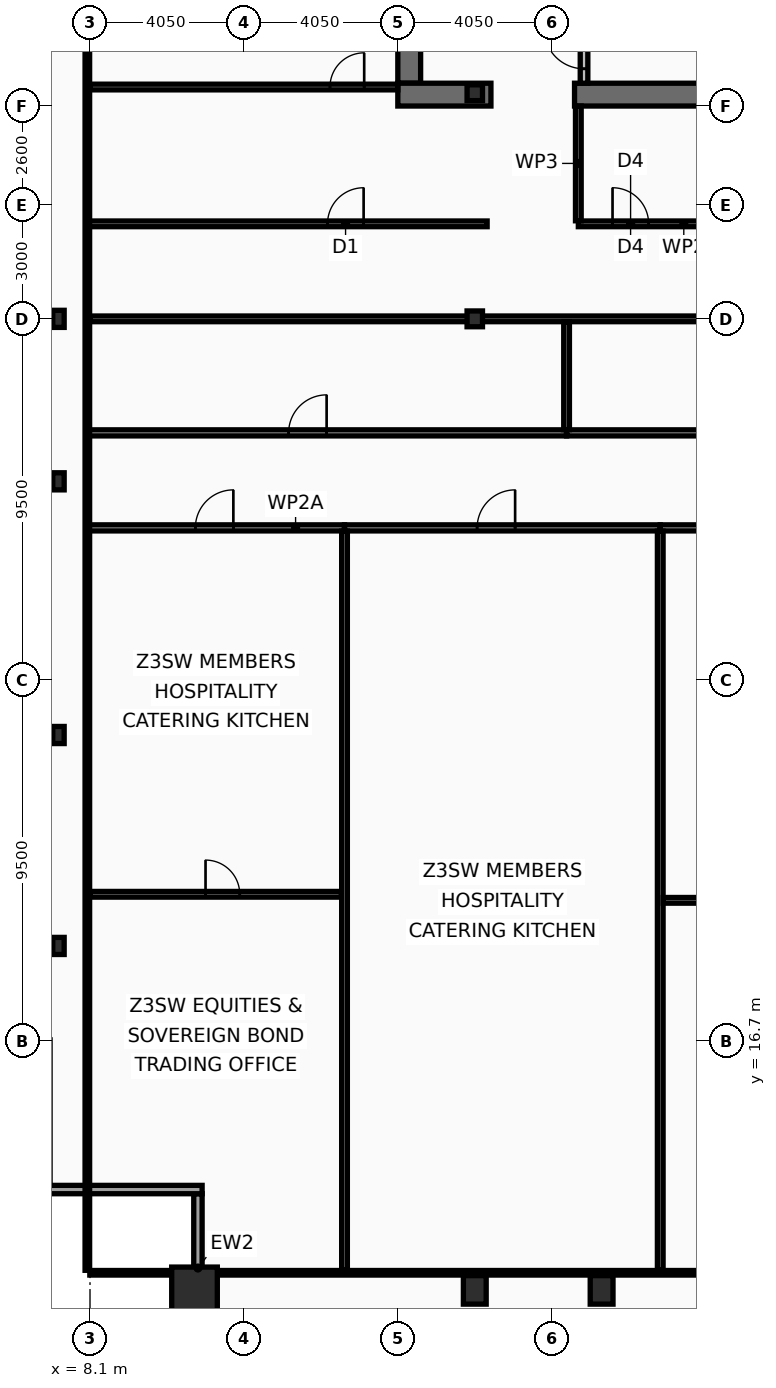
"""IFC4 building model, lengths in metres.
Left out: names, types, materials, properties, quantities, classifications, styles, units other than length and angle.
Written with IfcOpenShell. Run it as: python <this file> out.ifc"""

import sys

from ifc_helpers import new_model, si_unit, direction, frame, frame_2d, origin, origin_2d, place, context, subcontext, project, spatial, rectangle, hollow_rectangle, i_section, extrude, element, fill, save


model = new_model("IFC4")
c1 = context("Model", 3, precision=1e-05, world=origin(), true_north=direction((0.0, 1.0)))
c2 = subcontext(c1, "Body", "Model", "MODEL_VIEW")
j1 = project(units=[si_unit("LENGTHUNIT", "METRE"), si_unit("PLANEANGLEUNIT", "RADIAN")], contexts=[c1])
p1 = place(None, origin())
s1 = spatial("IfcSite", under=j1, at=p1, CompositionType="ELEMENT")
p2 = place(p1, origin())
s2 = spatial("IfcBuilding", under=s1, at=p2, CompositionType="ELEMENT")
p3 = place(p2, frame((0.0, 0.0, 221.0)))
s3 = spatial("IfcBuildingStorey", under=s2, at=p3, CompositionType="ELEMENT", Elevation=221.0)
p4 = place(p3, frame((16.5, 41.9, 0.0), z_axis=(0.0, 0.0, 1.0), x_axis=(0.0, 1.0, 0.0)))
e1 = element("IfcWall", 1, at=p4, inside=s3, PredefinedType="SHEAR", context=c2, shape_type="SweptSolid", body=[
    extrude(rectangle(XDim=11.2, YDim=0.6, at=frame_2d((5.6, 0.0))), origin(), (0.0, 0.0, 1.0), 3.44),
])
p5 = place(p3, frame((18.65, 41.6, 0.0), z_axis=(0.0, 0.0, 1.0), x_axis=(-1.0, 0.0, 0.0)))
e2 = element("IfcWall", 2, at=p5, inside=s3, PredefinedType="SHEAR", context=c2, shape_type="SweptSolid", body=[
    extrude(rectangle(XDim=2.45, YDim=0.6, at=frame_2d((1.225, 0.0))), origin(), (0.0, 0.0, 1.0), 3.44),
])
p6 = place(p3, frame((32.3, 41.6, 0.0), z_axis=(0.0, 0.0, 1.0), x_axis=(-1.0, 0.0, 0.0)))
e3 = element("IfcWall", 3, at=p6, inside=s3, PredefinedType="SHEAR", context=c2, shape_type="SweptSolid", body=[
    extrude(rectangle(XDim=11.45, YDim=0.6, at=frame_2d((5.725, 0.0))), origin(), (0.0, 0.0, 1.0), 3.44),
])
p7 = place(p3, frame((10.85, 10.15, 0.0), z_axis=(0.0, 0.0, 1.0), x_axis=(1.0, 0.0, 0.0)))
e4 = element("IfcColumn", 4, at=p7, inside=s3, PredefinedType="COLUMN", context=c2, shape_type="SweptSolid", body=[
    extrude(hollow_rectangle(XDim=1.2, YDim=1.2, WallThickness=0.06, at=origin_2d()), origin(), (0.0, 0.0, 1.0), 3.6),
])
for number, where, z_axis, x_axis in (
    (5, (18.225, 10.15, 0.0), (0.0, 0.0, 1.0), (1.0, 0.0, 0.0)),
    (6, (21.562, 10.15, 0.0), (0.0, 0.0, 1.0), (1.0, 0.0, 0.0)),
):
    element("IfcColumn", number, at=place(p3, frame(where, z_axis=z_axis, x_axis=x_axis)), inside=s3, PredefinedType="COLUMN", context=c2, shape_type="SweptSolid", body=[
        extrude(hollow_rectangle(XDim=0.6, YDim=0.75, WallThickness=0.045, at=origin_2d()), origin(), (0.0, 0.0, 1.0), 3.6),
    ])
for number, where, z_axis, x_axis in (
    (7, (7.27, 19.2, 0.0), (0.0, 0.0, 1.0), (1.0, 0.0, 0.0)),
    (8, (7.27, 24.75, 0.0), (0.0, 0.0, 1.0), (1.0, 0.0, 0.0)),
    (9, (7.27, 31.425, 0.0), (0.0, 0.0, 1.0), (1.0, 0.0, 0.0)),
    (10, (7.27, 35.7, 0.0), (0.0, 0.0, 1.0), (1.0, 0.0, 0.0)),
):
    element("IfcColumn", number, at=place(p3, frame(where, z_axis=z_axis, x_axis=x_axis)), inside=s3, PredefinedType="COLUMN", context=c2, shape_type="SweptSolid", body=[
        extrude(i_section(OverallWidth=0.3, OverallDepth=0.45, WebThickness=0.014, FlangeThickness=0.026, at=origin_2d()), origin(), (0.0, 0.0, 1.0), 3.6),
    ])
for number, where, z_axis, x_axis in (
    (11, (18.225, 35.7, 0.0), (0.0, 0.0, 1.0), (1.0, 0.0, 0.0)),
    (12, (18.225, 41.65, 0.0), (0.0, 0.0, 1.0), (1.0, 0.0, 0.0)),
):
    element("IfcColumn", number, at=place(p3, frame(where, z_axis=z_axis, x_axis=x_axis)), inside=s3, PredefinedType="COLUMN", context=c2, shape_type="SweptSolid", body=[
        extrude(i_section(OverallWidth=0.406, OverallDepth=0.416, WebThickness=0.03, FlangeThickness=0.048, at=origin_2d()), origin(), (0.0, 0.0, 1.0), 3.6),
    ])
p8 = place(p3, frame((10.94, 8.77, 0.0), z_axis=(0.0, 0.0, 1.0), x_axis=(0.0, 1.0, 0.0)))
e13 = element("IfcWall", 13, at=p8, inside=s3, PredefinedType="SOLIDWALL", context=c2, shape_type="SweptSolid", body=[
    extrude(rectangle(XDim=3.91, YDim=0.22, at=frame_2d((1.955, 0.0))), origin(), (0.0, 0.0, 1.0), 2.83),
])
p9 = place(p3, frame((11.05, 12.79, 0.0), z_axis=(0.0, 0.0, 1.0), x_axis=(-1.0, 0.0, 0.0)))
e14 = element("IfcWall", 14, at=p9, inside=s3, PredefinedType="SOLIDWALL", context=c2, shape_type="SweptSolid", body=[
    extrude(rectangle(XDim=4.22, YDim=0.22, at=frame_2d((2.11, 0.0))), origin(), (0.0, 0.0, 1.0), 2.83),
])
p10 = place(p3, frame((21.1, 41.9, 0.0), z_axis=(0.0, 0.0, 1.0), x_axis=(0.0, 1.0, 0.0)))
e15 = element("IfcWall", 15, at=p10, inside=s3, PredefinedType="PARTITIONING", context=c2, shape_type="SweptSolid", body=[
    extrude(rectangle(XDim=2.595, YDim=0.2, at=frame_2d((1.298, 0.0))), origin(), (0.0, 0.0, 1.0), 3.44),
])
p11 = place(p10, frame((0.38, 0.0, 0.0)))
e16 = element("IfcOpeningElement", 16, at=p11, cuts=e15, PredefinedType="OPENING", context=c2, shape_type="SweptSolid", body=[
    extrude(rectangle(XDim=1.05, YDim=2.15, at=frame_2d((0.525, 1.075))), frame((0.0, 0.11, 0.0), z_axis=(0.0, -1.0, 0.0), x_axis=(1.0, 0.0, 0.0)), (0.0, 0.0, 1.0), 0.22),
])
p12 = place(p3, frame((20.95, 38.2, 0.0), z_axis=(0.0, 0.0, 1.0), x_axis=(1.0, 0.0, 0.0)))
e17 = element("IfcWall", 17, at=p12, inside=s3, PredefinedType="PARTITIONING", context=c2, shape_type="SweptSolid", body=[
    extrude(rectangle(XDim=3.35, YDim=0.15, at=frame_2d((1.675, 0.0))), origin(), (0.0, 0.0, 1.0), 3.44),
])
p13 = place(p12, frame((0.9, 0.0, 0.0)))
e18 = element("IfcOpeningElement", 18, at=p13, cuts=e17, PredefinedType="OPENING", context=c2, shape_type="SweptSolid", body=[
    extrude(rectangle(XDim=0.95, YDim=2.05, at=frame_2d((0.475, 1.025))), frame((0.0, 0.085, 0.0), z_axis=(0.0, -1.0, 0.0), x_axis=(1.0, 0.0, 0.0)), (0.0, 0.0, 1.0), 0.17),
])
p14 = place(p3, frame((20.95, 38.28, 0.0), z_axis=(0.0, 0.0, 1.0), x_axis=(0.0, 1.0, 0.0)))
e19 = element("IfcWall", 19, at=p14, inside=s3, PredefinedType="PARTITIONING", context=c2, shape_type="SweptSolid", body=[
    extrude(rectangle(XDim=3.02, YDim=0.15, at=frame_2d((1.51, 0.0))), origin(), (0.0, 0.0, 1.0), 3.44),
])
p15 = place(p3, frame((8.03, 38.2, 0.0), z_axis=(0.0, 0.0, 1.0), x_axis=(1.0, 0.0, 0.0)))
e20 = element("IfcWall", 20, at=p15, inside=s3, PredefinedType="PARTITIONING", context=c2, shape_type="SweptSolid", body=[
    extrude(rectangle(XDim=10.52, YDim=0.15, at=frame_2d((5.26, 0.0))), origin(), (0.0, 0.0, 1.0), 2.78),
])
p16 = place(p15, frame((6.32, 0.0, 0.0)))
e21 = element("IfcOpeningElement", 21, at=p16, cuts=e20, PredefinedType="OPENING", context=c2, shape_type="SweptSolid", body=[
    extrude(rectangle(XDim=0.95, YDim=2.05, at=frame_2d((0.475, 1.025))), frame((0.0, 0.085, 0.0), z_axis=(0.0, -1.0, 0.0), x_axis=(1.0, 0.0, 0.0)), (0.0, 0.0, 1.0), 0.17),
])
p17 = place(p3, frame((8.095, 41.8, 0.0), z_axis=(0.0, 0.0, 1.0), x_axis=(1.0, 0.0, 0.0)))
e22 = element("IfcWall", 22, at=p17, inside=s3, PredefinedType="PARTITIONING", context=c2, shape_type="SweptSolid", body=[
    extrude(rectangle(XDim=8.105, YDim=0.15, at=frame_2d((4.052, 0.0))), origin(), (0.0, 0.0, 1.0), 3.44),
])
p18 = place(p17, frame((6.32, 0.0, 0.0)))
e23 = element("IfcOpeningElement", 23, at=p18, cuts=e22, PredefinedType="OPENING", context=c2, shape_type="SweptSolid", body=[
    extrude(rectangle(XDim=0.9, YDim=2.05, at=frame_2d((0.45, 1.025))), frame((0.0, 0.085, 0.0), z_axis=(0.0, -1.0, 0.0), x_axis=(1.0, 0.0, 0.0)), (0.0, 0.0, 1.0), 0.17),
])
p19 = place(p3, frame((8.095, 35.7, 0.0), z_axis=(0.0, 0.0, 1.0), x_axis=(1.0, 0.0, 0.0)))
e24 = element("IfcWall", 24, at=p19, inside=s3, PredefinedType="PARTITIONING", context=c2, shape_type="SweptSolid", body=[
    extrude(rectangle(XDim=24.925, YDim=0.15, at=frame_2d((12.462, 0.0))), origin(), (0.0, 0.0, 1.0), 2.78),
])
p20 = place(p3, frame((8.03, 30.2, 0.0), z_axis=(0.0, 0.0, 1.0), x_axis=(1.0, 0.0, 0.0)))
e25 = element("IfcWall", 25, at=p20, inside=s3, PredefinedType="PARTITIONING", context=c2, shape_type="SweptSolid", body=[
    extrude(rectangle(XDim=6.767, YDim=0.16, at=frame_2d((3.384, 0.0))), origin(), (0.0, 0.0, 1.0), 3.44),
])
p21 = place(p20, frame((2.842, 0.0, 0.0)))
e26 = element("IfcOpeningElement", 26, at=p21, cuts=e25, PredefinedType="OPENING", context=c2, shape_type="SweptSolid", body=[
    extrude(rectangle(XDim=1.0, YDim=2.05, at=frame_2d((0.5, 1.025))), frame((0.0, 0.09, 0.0), z_axis=(0.0, -1.0, 0.0), x_axis=(1.0, 0.0, 0.0)), (0.0, 0.0, 1.0), 0.18),
])
p22 = place(p3, frame((8.095, 20.559, 0.0), z_axis=(0.0, 0.0, 1.0), x_axis=(1.0, 0.0, 0.0)))
e27 = element("IfcWall", 27, at=p22, inside=s3, PredefinedType="PARTITIONING", context=c2, shape_type="SweptSolid", body=[
    extrude(rectangle(XDim=6.622, YDim=0.15, at=frame_2d((3.311, 0.0))), origin(), (0.0, 0.0, 1.0), 3.44),
])
p23 = place(p22, frame((3.045, 0.0, 0.0)))
e28 = element("IfcOpeningElement", 28, at=p23, cuts=e27, PredefinedType="OPENING", context=c2, shape_type="SweptSolid", body=[
    extrude(rectangle(XDim=0.9, YDim=2.05, at=frame_2d((0.45, 1.025))), frame((0.0, 0.085, 0.0), z_axis=(0.0, -1.0, 0.0), x_axis=(1.0, 0.0, 0.0)), (0.0, 0.0, 1.0), 0.17),
])
p24 = place(p3, frame((14.797, 30.2, 0.0), z_axis=(0.0, 0.0, 1.0), x_axis=(1.0, 0.0, 0.0)))
e29 = element("IfcWall", 29, at=p24, inside=s3, PredefinedType="PARTITIONING", context=c2, shape_type="SweptSolid", body=[
    extrude(rectangle(XDim=8.308, YDim=0.16, at=frame_2d((4.154, 0.0))), origin(), (0.0, 0.0, 1.0), 2.78),
])
p25 = place(p24, frame((3.49, 0.0, 0.0)))
e30 = element("IfcOpeningElement", 30, at=p25, cuts=e29, PredefinedType="OPENING", context=c2, shape_type="SweptSolid", body=[
    extrude(rectangle(XDim=1.0, YDim=2.05, at=frame_2d((0.5, 1.025))), frame((0.0, 0.09, 0.0), z_axis=(0.0, -1.0, 0.0), x_axis=(1.0, 0.0, 0.0)), (0.0, 0.0, 1.0), 0.18),
])
p26 = place(p3, frame((14.797, 10.665, 0.0), z_axis=(0.0, 0.0, 1.0), x_axis=(0.0, 1.0, 0.0)))
e31 = element("IfcWall", 31, at=p26, inside=s3, PredefinedType="PARTITIONING", context=c2, shape_type="SweptSolid", body=[
    extrude(rectangle(XDim=19.45, YDim=0.15, at=frame_2d((9.725, 0.0))), origin(), (0.0, 0.0, 1.0), 2.78),
])
p27 = place(p3, frame((23.105, 30.2, 0.0), z_axis=(0.0, 0.0, 1.0), x_axis=(1.0, 0.0, 0.0)))
e32 = element("IfcWall", 32, at=p27, inside=s3, PredefinedType="PARTITIONING", context=c2, shape_type="SweptSolid", body=[
    extrude(rectangle(XDim=9.995, YDim=0.16, at=frame_2d((4.998, 0.0))), origin(), (0.0, 0.0, 1.0), 2.78),
])
p28 = place(p27, frame((4.198, 0.0, 0.0)))
e33 = element("IfcOpeningElement", 33, at=p28, cuts=e32, PredefinedType="OPENING", context=c2, shape_type="SweptSolid", body=[
    extrude(rectangle(XDim=1.0, YDim=2.05, at=frame_2d((0.5, 1.025))), frame((0.0, 0.09, 0.0), z_axis=(0.0, -1.0, 0.0), x_axis=(1.0, 0.0, 0.0)), (0.0, 0.0, 1.0), 0.18),
])
p29 = place(p3, frame((23.105, 10.665, 0.0), z_axis=(0.0, 0.0, 1.0), x_axis=(0.0, 1.0, 0.0)))
e34 = element("IfcWall", 34, at=p29, inside=s3, PredefinedType="PARTITIONING", context=c2, shape_type="SweptSolid", body=[
    extrude(rectangle(XDim=19.45, YDim=0.15, at=frame_2d((9.725, 0.0))), origin(), (0.0, 0.0, 1.0), 2.98),
])
p30 = place(p3, frame((23.185, 20.4, 0.0), z_axis=(0.0, 0.0, 1.0), x_axis=(1.0, 0.0, 0.0)))
e35 = element("IfcWall", 35, at=p30, inside=s3, PredefinedType="PARTITIONING", context=c2, shape_type="SweptSolid", body=[
    extrude(rectangle(XDim=9.835, YDim=0.15, at=frame_2d((4.917, 0.0))), origin(), (0.0, 0.0, 1.0), 2.78),
])
p31 = place(p30, frame((4.498, 0.0, 0.0)))
e36 = element("IfcOpeningElement", 36, at=p31, cuts=e35, PredefinedType="OPENING", context=c2, shape_type="SweptSolid", body=[
    extrude(rectangle(XDim=0.9, YDim=2.05, at=frame_2d((0.45, 1.025))), frame((0.0, 0.085, 0.0), z_axis=(0.0, -1.0, 0.0), x_axis=(1.0, 0.0, 0.0)), (0.0, 0.0, 1.0), 0.17),
])
p32 = place(p3, frame((8.03, 32.7, 0.0), z_axis=(0.0, 0.0, 1.0), x_axis=(1.0, 0.0, 0.0)))
e37 = element("IfcWall", 37, at=p32, inside=s3, PredefinedType="PARTITIONING", context=c2, shape_type="SweptSolid", body=[
    extrude(rectangle(XDim=12.611, YDim=0.16, at=frame_2d((6.305, 0.0))), origin(), (0.0, 0.0, 1.0), 2.78),
])
p33 = place(p32, frame((5.296, 0.0, 0.0)))
e38 = element("IfcOpeningElement", 38, at=p33, cuts=e37, PredefinedType="OPENING", context=c2, shape_type="SweptSolid", body=[
    extrude(rectangle(XDim=1.0, YDim=2.05, at=frame_2d((0.5, 1.025))), frame((0.0, 0.09, 0.0), z_axis=(0.0, -1.0, 0.0), x_axis=(1.0, 0.0, 0.0)), (0.0, 0.0, 1.0), 0.18),
])
p34 = place(p3, frame((20.641, 32.7, 0.0), z_axis=(0.0, 0.0, 1.0), x_axis=(1.0, 0.0, 0.0)))
e39 = element("IfcWall", 39, at=p34, inside=s3, PredefinedType="PARTITIONING", context=c2, shape_type="SweptSolid", body=[
    extrude(rectangle(XDim=12.459, YDim=0.16, at=frame_2d((6.23, 0.0))), origin(), (0.0, 0.0, 1.0), 2.78),
])
p35 = place(p34, frame((5.233, 0.0, 0.0)))
e40 = element("IfcOpeningElement", 40, at=p35, cuts=e39, PredefinedType="OPENING", context=c2, shape_type="SweptSolid", body=[
    extrude(rectangle(XDim=1.0, YDim=2.05, at=frame_2d((0.5, 1.025))), frame((0.0, 0.09, 0.0), z_axis=(0.0, -1.0, 0.0), x_axis=(1.0, 0.0, 0.0)), (0.0, 0.0, 1.0), 0.18),
])
p36 = place(p3, frame((20.641, 32.785, 0.0), z_axis=(0.0, 0.0, 1.0), x_axis=(0.0, 1.0, 0.0)))
e41 = element("IfcWall", 41, at=p36, inside=s3, PredefinedType="PARTITIONING", context=c2, shape_type="SweptSolid", body=[
    extrude(rectangle(XDim=2.835, YDim=0.15, at=frame_2d((1.417, 0.0))), origin(), (0.0, 0.0, 1.0), 2.98),
])
p37 = place(p3, frame((8.03, 10.665, 0.0), z_axis=(0.0, 0.0, 1.0), x_axis=(0.0, 1.0, 0.0)))
e42 = element("IfcWall", 42, at=p37, inside=s3, PredefinedType="PARTITIONING", context=c2, shape_type="SweptSolid", body=[
    extrude(rectangle(XDim=42.11, YDim=0.12, at=frame_2d((21.055, 0.0))), origin(), (0.0, 0.0, 1.0), 2.78),
])
p38 = place(p3, frame((8.095, 10.6, 0.0), z_axis=(0.0, 0.0, 1.0), x_axis=(1.0, 0.0, 0.0)))
e43 = element("IfcWall", 43, at=p38, inside=s3, PredefinedType="PARTITIONING", context=c2, shape_type="SweptSolid", body=[
    extrude(rectangle(XDim=56.71, YDim=0.12, at=frame_2d((28.355, 0.0))), origin(), (0.0, 0.0, 1.0), 2.78),
])
p39 = place(p11, origin())
e44 = element("IfcDoor", 44, at=p39, inside=s3, OperationType="SINGLE_SWING_RIGHT", PredefinedType="DOOR", context=c2, shape_type="SweptSolid", body=[
    extrude(rectangle(XDim=1.05, YDim=2.15, at=frame_2d((0.525, 1.075))), frame((0.0, 0.025, 0.0), z_axis=(0.0, -1.0, 0.0), x_axis=(1.0, 0.0, 0.0)), (0.0, 0.0, 1.0), 0.05),
])
fill(e16, e44)
p40 = place(p13, origin())
e45 = element("IfcDoor", 45, at=p40, inside=s3, OperationType="SINGLE_SWING_LEFT", PredefinedType="DOOR", context=c2, shape_type="SweptSolid", body=[
    extrude(rectangle(XDim=0.95, YDim=2.05, at=frame_2d((0.475, 1.025))), frame((0.0, 0.025, 0.0), z_axis=(0.0, -1.0, 0.0), x_axis=(1.0, 0.0, 0.0)), (0.0, 0.0, 1.0), 0.05),
])
fill(e18, e45)
p41 = place(p16, origin())
e46 = element("IfcDoor", 46, at=p41, inside=s3, OperationType="SINGLE_SWING_RIGHT", PredefinedType="DOOR", context=c2, shape_type="SweptSolid", body=[
    extrude(rectangle(XDim=0.95, YDim=2.05, at=frame_2d((0.475, 1.025))), frame((0.0, 0.025, 0.0), z_axis=(0.0, -1.0, 0.0), x_axis=(1.0, 0.0, 0.0)), (0.0, 0.0, 1.0), 0.05),
])
fill(e21, e46)
p42 = place(p18, origin())
e47 = element("IfcDoor", 47, at=p42, inside=s3, OperationType="SINGLE_SWING_RIGHT", PredefinedType="DOOR", context=c2, shape_type="SweptSolid", body=[
    extrude(rectangle(XDim=0.9, YDim=2.05, at=frame_2d((0.45, 1.025))), frame((0.0, 0.025, 0.0), z_axis=(0.0, -1.0, 0.0), x_axis=(1.0, 0.0, 0.0)), (0.0, 0.0, 1.0), 0.05),
])
fill(e23, e47)
p43 = place(p21, origin())
e48 = element("IfcDoor", 48, at=p43, inside=s3, OperationType="SINGLE_SWING_RIGHT", PredefinedType="DOOR", context=c2, shape_type="SweptSolid", body=[
    extrude(rectangle(XDim=1.0, YDim=2.05, at=frame_2d((0.5, 1.025))), frame((0.0, 0.025, 0.0), z_axis=(0.0, -1.0, 0.0), x_axis=(1.0, 0.0, 0.0)), (0.0, 0.0, 1.0), 0.05),
])
fill(e26, e48)
p44 = place(p23, origin())
e49 = element("IfcDoor", 49, at=p44, inside=s3, OperationType="SINGLE_SWING_LEFT", PredefinedType="DOOR", context=c2, shape_type="SweptSolid", body=[
    extrude(rectangle(XDim=0.9, YDim=2.05, at=frame_2d((0.45, 1.025))), frame((0.0, 0.025, 0.0), z_axis=(0.0, -1.0, 0.0), x_axis=(1.0, 0.0, 0.0)), (0.0, 0.0, 1.0), 0.05),
])
fill(e28, e49)
p45 = place(p25, origin())
e50 = element("IfcDoor", 50, at=p45, inside=s3, OperationType="SINGLE_SWING_RIGHT", PredefinedType="DOOR", context=c2, shape_type="SweptSolid", body=[
    extrude(rectangle(XDim=1.0, YDim=2.05, at=frame_2d((0.5, 1.025))), frame((0.0, 0.025, 0.0), z_axis=(0.0, -1.0, 0.0), x_axis=(1.0, 0.0, 0.0)), (0.0, 0.0, 1.0), 0.05),
])
fill(e30, e50)
p46 = place(p33, origin())
e51 = element("IfcDoor", 51, at=p46, inside=s3, OperationType="SINGLE_SWING_RIGHT", PredefinedType="DOOR", context=c2, shape_type="SweptSolid", body=[
    extrude(rectangle(XDim=1.0, YDim=2.05, at=frame_2d((0.5, 1.025))), frame((0.0, 0.025, 0.0), z_axis=(0.0, -1.0, 0.0), x_axis=(1.0, 0.0, 0.0)), (0.0, 0.0, 1.0), 0.05),
])
fill(e38, e51)
save(model, sys.argv[1])
